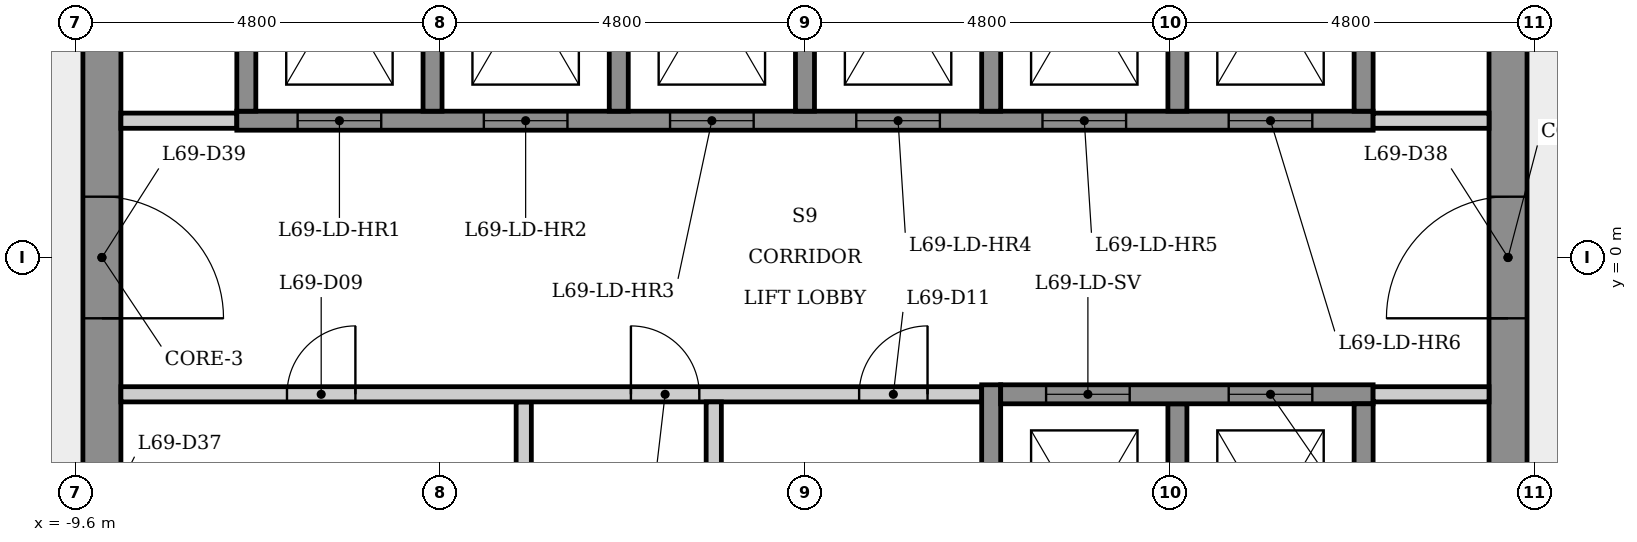
"""IFC4 building model, lengths in metres.
Left out: names, types, materials, properties, quantities, classifications, styles, units other than length and angle.
Written with IfcOpenShell. Run it as: python <this file> out.ifc"""

import sys

from ifc_helpers import new_model, si_unit, direction, frame, frame_2d, origin, place, context, subcontext, project, spatial, rectangle, extrude, element, fill, save


model = new_model("IFC4")
c1 = context("Model", 3, precision=1e-05, world=origin(), true_north=direction((0.0, 1.0)))
c2 = subcontext(c1, "Body", "Model", "MODEL_VIEW")
j1 = project(units=[si_unit("LENGTHUNIT", "METRE"), si_unit("PLANEANGLEUNIT", "RADIAN")], contexts=[c1])
p1 = place(None, origin())
s1 = spatial("IfcSite", under=j1, at=p1, CompositionType="ELEMENT")
p2 = place(p1, origin())
s2 = spatial("IfcBuilding", under=s1, at=p2, CompositionType="ELEMENT")
p3 = place(p2, frame((0.0, 0.0, 257.9)))
s3 = spatial("IfcBuildingStorey", under=s2, at=p3, CompositionType="ELEMENT", Elevation=257.9)
p4 = place(p3, frame((9.25, -5.485, 0.0), z_axis=(0.0, 0.0, 1.0), x_axis=(0.0, 1.0, 0.0)))
e1 = element("IfcWall", 1, at=p4, inside=s3, PredefinedType="SHEAR", context=c2, shape_type="SweptSolid", body=[
    extrude(rectangle(XDim=10.97, YDim=0.5, at=frame_2d((5.485, 0.0))), origin(), (0.0, 0.0, 1.0), 5.0),
])
p5 = place(p4, frame((4.685, 0.0, 0.0)))
e2 = element("IfcOpeningElement", 2, at=p5, cuts=e1, PredefinedType="OPENING", context=c2, shape_type="SweptSolid", body=[
    extrude(rectangle(XDim=1.6, YDim=2.1, at=frame_2d((0.8, 1.05))), frame((0.0, 0.26, 0.0), z_axis=(0.0, -1.0, 0.0), x_axis=(1.0, 0.0, 0.0)), (0.0, 0.0, 1.0), 0.52),
])
p6 = place(p3, frame((-9.25, 5.485, 0.0), z_axis=(0.0, 0.0, 1.0), x_axis=(0.0, -1.0, 0.0)))
e3 = element("IfcWall", 3, at=p6, inside=s3, PredefinedType="SHEAR", context=c2, shape_type="SweptSolid", body=[
    extrude(rectangle(XDim=10.97, YDim=0.5, at=frame_2d((5.485, 0.0))), origin(), (0.0, 0.0, 1.0), 5.0),
])
p7 = place(p6, frame((8.51, 0.0, 0.0)))
e4 = element("IfcOpeningElement", 4, at=p7, cuts=e3, PredefinedType="OPENING", context=c2, shape_type="SweptSolid", body=[
    extrude(rectangle(XDim=0.9, YDim=2.1, at=frame_2d((0.45, 1.05))), frame((0.0, 0.26, 0.0), z_axis=(0.0, -1.0, 0.0), x_axis=(1.0, 0.0, 0.0)), (0.0, 0.0, 1.0), 0.52),
])
p8 = place(p6, frame((4.685, 0.0, 0.0)))
e5 = element("IfcOpeningElement", 5, at=p8, cuts=e3, PredefinedType="OPENING", context=c2, shape_type="SweptSolid", body=[
    extrude(rectangle(XDim=1.6, YDim=2.1, at=frame_2d((0.8, 1.05))), frame((0.0, 0.26, 0.0), z_axis=(0.0, -1.0, 0.0), x_axis=(1.0, 0.0, 0.0)), (0.0, 0.0, 1.0), 0.52),
])
p9 = place(p3, frame((-9.0, 1.8, 0.0), z_axis=(0.0, 0.0, 1.0), x_axis=(1.0, 0.0, 0.0)))
e6 = element("IfcWall", 6, at=p9, inside=s3, PredefinedType="PARTITIONING", context=c2, shape_type="SweptSolid", body=[
    extrude(rectangle(XDim=1.525, YDim=0.2, at=frame_2d((0.763, 0.0))), origin(), (0.0, 0.0, 1.0), 4.6),
])
p10 = place(p3, frame((-7.475, 1.8, 0.0), z_axis=(0.0, 0.0, 1.0), x_axis=(1.0, 0.0, 0.0)))
e7 = element("IfcWall", 7, at=p10, inside=s3, PredefinedType="SHEAR", context=c2, shape_type="SweptSolid", body=[
    extrude(rectangle(XDim=14.95, YDim=0.25, at=frame_2d((7.475, 0.0))), origin(), (0.0, 0.0, 1.0), 4.6),
])
p11 = place(p10, frame((0.8, 0.0, 0.0)))
e8 = element("IfcOpeningElement", 8, at=p11, cuts=e7, PredefinedType="OPENING", context=c2, shape_type="SweptSolid", body=[
    extrude(rectangle(XDim=1.1, YDim=2.1, at=frame_2d((0.55, 1.05))), frame((0.0, 0.135, 0.0), z_axis=(0.0, -1.0, 0.0), x_axis=(1.0, 0.0, 0.0)), (0.0, 0.0, 1.0), 0.27),
])
p12 = place(p10, frame((3.25, 0.0, 0.0)))
e9 = element("IfcOpeningElement", 9, at=p12, cuts=e7, PredefinedType="OPENING", context=c2, shape_type="SweptSolid", body=[
    extrude(rectangle(XDim=1.1, YDim=2.1, at=frame_2d((0.55, 1.05))), frame((0.0, 0.135, 0.0), z_axis=(0.0, -1.0, 0.0), x_axis=(1.0, 0.0, 0.0)), (0.0, 0.0, 1.0), 0.27),
])
p13 = place(p10, frame((5.7, 0.0, 0.0)))
e10 = element("IfcOpeningElement", 10, at=p13, cuts=e7, PredefinedType="OPENING", context=c2, shape_type="SweptSolid", body=[
    extrude(rectangle(XDim=1.1, YDim=2.1, at=frame_2d((0.55, 1.05))), frame((0.0, 0.135, 0.0), z_axis=(0.0, -1.0, 0.0), x_axis=(1.0, 0.0, 0.0)), (0.0, 0.0, 1.0), 0.27),
])
p14 = place(p10, frame((8.15, 0.0, 0.0)))
e11 = element("IfcOpeningElement", 11, at=p14, cuts=e7, PredefinedType="OPENING", context=c2, shape_type="SweptSolid", body=[
    extrude(rectangle(XDim=1.1, YDim=2.1, at=frame_2d((0.55, 1.05))), frame((0.0, 0.135, 0.0), z_axis=(0.0, -1.0, 0.0), x_axis=(1.0, 0.0, 0.0)), (0.0, 0.0, 1.0), 0.27),
])
p15 = place(p10, frame((10.6, 0.0, 0.0)))
e12 = element("IfcOpeningElement", 12, at=p15, cuts=e7, PredefinedType="OPENING", context=c2, shape_type="SweptSolid", body=[
    extrude(rectangle(XDim=1.1, YDim=2.1, at=frame_2d((0.55, 1.05))), frame((0.0, 0.135, 0.0), z_axis=(0.0, -1.0, 0.0), x_axis=(1.0, 0.0, 0.0)), (0.0, 0.0, 1.0), 0.27),
])
p16 = place(p10, frame((13.05, 0.0, 0.0)))
e13 = element("IfcOpeningElement", 13, at=p16, cuts=e7, PredefinedType="OPENING", context=c2, shape_type="SweptSolid", body=[
    extrude(rectangle(XDim=1.1, YDim=2.1, at=frame_2d((0.55, 1.05))), frame((0.0, 0.135, 0.0), z_axis=(0.0, -1.0, 0.0), x_axis=(1.0, 0.0, 0.0)), (0.0, 0.0, 1.0), 0.27),
])
p17 = place(p3, frame((-7.35, 1.925, 0.0), z_axis=(0.0, 0.0, 1.0), x_axis=(0.0, 1.0, 0.0)))
e14 = element("IfcWall", 14, at=p17, inside=s3, PredefinedType="SHEAR", context=c2, shape_type="SweptSolid", body=[
    extrude(rectangle(XDim=3.35, YDim=0.25, at=frame_2d((1.675, 0.0))), origin(), (0.0, 0.0, 1.0), 4.6),
])
p18 = place(p3, frame((-4.9, 5.025, 0.0), z_axis=(0.0, 0.0, 1.0), x_axis=(0.0, -1.0, 0.0)))
e15 = element("IfcWall", 15, at=p18, inside=s3, PredefinedType="SHEAR", context=c2, shape_type="SweptSolid", body=[
    extrude(rectangle(XDim=3.1, YDim=0.25, at=frame_2d((1.55, 0.0))), origin(), (0.0, 0.0, 1.0), 4.6),
])
p19 = place(p3, frame((-3.7, -1.9, 0.0), z_axis=(0.0, 0.0, 1.0), x_axis=(0.0, -1.0, 0.0)))
e16 = element("IfcWall", 16, at=p19, inside=s3, PredefinedType="PARTITIONING", context=c2, shape_type="SweptSolid", body=[
    extrude(rectangle(XDim=3.15, YDim=0.2, at=frame_2d((1.575, 0.0))), origin(), (0.0, 0.0, 1.0), 4.6),
])
p20 = place(p3, frame((-9.0, -1.8, 0.0), z_axis=(0.0, 0.0, 1.0), x_axis=(1.0, 0.0, 0.0)))
e17 = element("IfcWall", 17, at=p20, inside=s3, PredefinedType="PARTITIONING", context=c2, shape_type="SweptSolid", body=[
    extrude(rectangle(XDim=11.325, YDim=0.2, at=frame_2d((5.663, 0.0))), origin(), (0.0, 0.0, 1.0), 4.6),
])
p21 = place(p20, frame((2.185, 0.0, 0.0)))
e18 = element("IfcOpeningElement", 18, at=p21, cuts=e17, PredefinedType="OPENING", context=c2, shape_type="SweptSolid", body=[
    extrude(rectangle(XDim=0.9, YDim=2.1, at=frame_2d((0.45, 1.05))), frame((0.0, 0.11, 0.0), z_axis=(0.0, -1.0, 0.0), x_axis=(1.0, 0.0, 0.0)), (0.0, 0.0, 1.0), 0.22),
])
p22 = place(p20, frame((6.71, 0.0, 0.0)))
e19 = element("IfcOpeningElement", 19, at=p22, cuts=e17, PredefinedType="OPENING", context=c2, shape_type="SweptSolid", body=[
    extrude(rectangle(XDim=0.9, YDim=2.1, at=frame_2d((0.45, 1.05))), frame((0.0, 0.11, 0.0), z_axis=(0.0, -1.0, 0.0), x_axis=(1.0, 0.0, 0.0)), (0.0, 0.0, 1.0), 0.22),
])
p23 = place(p20, frame((9.713, 0.0, 0.0)))
e20 = element("IfcOpeningElement", 20, at=p23, cuts=e17, PredefinedType="OPENING", context=c2, shape_type="SweptSolid", body=[
    extrude(rectangle(XDim=0.9, YDim=2.1, at=frame_2d((0.45, 1.05))), frame((0.0, 0.11, 0.0), z_axis=(0.0, -1.0, 0.0), x_axis=(1.0, 0.0, 0.0)), (0.0, 0.0, 1.0), 0.22),
])
p24 = place(p3, frame((-2.45, 5.025, 0.0), z_axis=(0.0, 0.0, 1.0), x_axis=(0.0, -1.0, 0.0)))
e21 = element("IfcWall", 21, at=p24, inside=s3, PredefinedType="SHEAR", context=c2, shape_type="SweptSolid", body=[
    extrude(rectangle(XDim=3.1, YDim=0.25, at=frame_2d((1.55, 0.0))), origin(), (0.0, 0.0, 1.0), 4.6),
])
p25 = place(p3, frame((-1.2, -1.9, 0.0), z_axis=(0.0, 0.0, 1.0), x_axis=(0.0, -1.0, 0.0)))
e22 = element("IfcWall", 22, at=p25, inside=s3, PredefinedType="PARTITIONING", context=c2, shape_type="SweptSolid", body=[
    extrude(rectangle(XDim=3.15, YDim=0.2, at=frame_2d((1.575, 0.0))), origin(), (0.0, 0.0, 1.0), 4.6),
])
p26 = place(p3, frame((0.0, 5.025, 0.0), z_axis=(0.0, 0.0, 1.0), x_axis=(0.0, -1.0, 0.0)))
e23 = element("IfcWall", 23, at=p26, inside=s3, PredefinedType="SHEAR", context=c2, shape_type="SweptSolid", body=[
    extrude(rectangle(XDim=3.1, YDim=0.25, at=frame_2d((1.55, 0.0))), origin(), (0.0, 0.0, 1.0), 4.6),
])
p27 = place(p3, frame((2.45, -5.275, 0.0), z_axis=(0.0, 0.0, 1.0), x_axis=(0.0, 1.0, 0.0)))
e24 = element("IfcWall", 24, at=p27, inside=s3, PredefinedType="SHEAR", context=c2, shape_type="SweptSolid", body=[
    extrude(rectangle(XDim=3.6, YDim=0.25, at=frame_2d((1.8, 0.0))), origin(), (0.0, 0.0, 1.0), 4.6),
])
p28 = place(p3, frame((2.45, 5.025, 0.0), z_axis=(0.0, 0.0, 1.0), x_axis=(0.0, -1.0, 0.0)))
e25 = element("IfcWall", 25, at=p28, inside=s3, PredefinedType="SHEAR", context=c2, shape_type="SweptSolid", body=[
    extrude(rectangle(XDim=3.1, YDim=0.25, at=frame_2d((1.55, 0.0))), origin(), (0.0, 0.0, 1.0), 4.6),
])
p29 = place(p3, frame((4.9, -1.925, 0.0), z_axis=(0.0, 0.0, 1.0), x_axis=(0.0, -1.0, 0.0)))
e26 = element("IfcWall", 26, at=p29, inside=s3, PredefinedType="SHEAR", context=c2, shape_type="SweptSolid", body=[
    extrude(rectangle(XDim=3.1, YDim=0.25, at=frame_2d((1.55, 0.0))), origin(), (0.0, 0.0, 1.0), 5.0),
])
p30 = place(p3, frame((4.9, 5.025, 0.0), z_axis=(0.0, 0.0, 1.0), x_axis=(0.0, -1.0, 0.0)))
e27 = element("IfcWall", 27, at=p30, inside=s3, PredefinedType="SHEAR", context=c2, shape_type="SweptSolid", body=[
    extrude(rectangle(XDim=3.1, YDim=0.25, at=frame_2d((1.55, 0.0))), origin(), (0.0, 0.0, 1.0), 4.6),
])
p31 = place(p3, frame((2.575, -1.8, 0.0), z_axis=(0.0, 0.0, 1.0), x_axis=(1.0, 0.0, 0.0)))
e28 = element("IfcWall", 28, at=p31, inside=s3, PredefinedType="SHEAR", context=c2, shape_type="SweptSolid", body=[
    extrude(rectangle(XDim=4.9, YDim=0.25, at=frame_2d((2.45, 0.0))), origin(), (0.0, 0.0, 1.0), 4.6),
])
p32 = place(p31, frame((0.597, 0.0, 0.0)))
e29 = element("IfcOpeningElement", 29, at=p32, cuts=e28, PredefinedType="OPENING", context=c2, shape_type="SweptSolid", body=[
    extrude(rectangle(XDim=1.1, YDim=2.1, at=frame_2d((0.55, 1.05))), frame((0.0, 0.135, 0.0), z_axis=(0.0, -1.0, 0.0), x_axis=(1.0, 0.0, 0.0)), (0.0, 0.0, 1.0), 0.27),
])
p33 = place(p31, frame((3.0, 0.0, 0.0)))
e30 = element("IfcOpeningElement", 30, at=p33, cuts=e28, PredefinedType="OPENING", context=c2, shape_type="SweptSolid", body=[
    extrude(rectangle(XDim=1.1, YDim=2.1, at=frame_2d((0.55, 1.05))), frame((0.0, 0.135, 0.0), z_axis=(0.0, -1.0, 0.0), x_axis=(1.0, 0.0, 0.0)), (0.0, 0.0, 1.0), 0.27),
])
p34 = place(p3, frame((7.475, 1.8, 0.0), z_axis=(0.0, 0.0, 1.0), x_axis=(1.0, 0.0, 0.0)))
e31 = element("IfcWall", 31, at=p34, inside=s3, PredefinedType="PARTITIONING", context=c2, shape_type="SweptSolid", body=[
    extrude(rectangle(XDim=1.525, YDim=0.2, at=frame_2d((0.763, 0.0))), origin(), (0.0, 0.0, 1.0), 4.6),
])
for number, where, z_axis, x_axis in (
    (32, (7.35, -1.925, 0.0), (0.0, 0.0, 1.0), (0.0, -1.0, 0.0)),
    (33, (7.35, 5.025, 0.0), (0.0, 0.0, 1.0), (0.0, -1.0, 0.0)),
):
    element("IfcWall", number, at=place(p3, frame(where, z_axis=z_axis, x_axis=x_axis)), inside=s3, PredefinedType="SHEAR", context=c2, shape_type="SweptSolid", body=[
        extrude(rectangle(XDim=3.1, YDim=0.25, at=frame_2d((1.55, 0.0))), origin(), (0.0, 0.0, 1.0), 4.6),
    ])
p35 = place(p3, frame((9.0, -1.8, 0.0), z_axis=(0.0, 0.0, 1.0), x_axis=(-1.0, 0.0, 0.0)))
e34 = element("IfcWall", 34, at=p35, inside=s3, PredefinedType="PARTITIONING", context=c2, shape_type="SweptSolid", body=[
    extrude(rectangle(XDim=1.525, YDim=0.2, at=frame_2d((0.763, 0.0))), origin(), (0.0, 0.0, 1.0), 4.6),
])
p36 = place(p11, origin())
e35 = element("IfcDoor", 35, at=p36, inside=s3, OperationType="SLIDING_TO_LEFT", PredefinedType="DOOR", context=c2, shape_type="SweptSolid", body=[
    extrude(rectangle(XDim=1.1, YDim=2.1, at=frame_2d((0.55, 1.05))), frame((0.0, 0.025, 0.0), z_axis=(0.0, -1.0, 0.0), x_axis=(1.0, 0.0, 0.0)), (0.0, 0.0, 1.0), 0.05),
])
fill(e8, e35)
p37 = place(p12, origin())
e36 = element("IfcDoor", 36, at=p37, inside=s3, OperationType="SLIDING_TO_LEFT", PredefinedType="DOOR", context=c2, shape_type="SweptSolid", body=[
    extrude(rectangle(XDim=1.1, YDim=2.1, at=frame_2d((0.55, 1.05))), frame((0.0, 0.025, 0.0), z_axis=(0.0, -1.0, 0.0), x_axis=(1.0, 0.0, 0.0)), (0.0, 0.0, 1.0), 0.05),
])
fill(e9, e36)
p38 = place(p13, origin())
e37 = element("IfcDoor", 37, at=p38, inside=s3, OperationType="SLIDING_TO_LEFT", PredefinedType="DOOR", context=c2, shape_type="SweptSolid", body=[
    extrude(rectangle(XDim=1.1, YDim=2.1, at=frame_2d((0.55, 1.05))), frame((0.0, 0.025, 0.0), z_axis=(0.0, -1.0, 0.0), x_axis=(1.0, 0.0, 0.0)), (0.0, 0.0, 1.0), 0.05),
])
fill(e10, e37)
p39 = place(p14, origin())
e38 = element("IfcDoor", 38, at=p39, inside=s3, OperationType="SLIDING_TO_LEFT", PredefinedType="DOOR", context=c2, shape_type="SweptSolid", body=[
    extrude(rectangle(XDim=1.1, YDim=2.1, at=frame_2d((0.55, 1.05))), frame((0.0, 0.025, 0.0), z_axis=(0.0, -1.0, 0.0), x_axis=(1.0, 0.0, 0.0)), (0.0, 0.0, 1.0), 0.05),
])
fill(e11, e38)
p40 = place(p15, origin())
e39 = element("IfcDoor", 39, at=p40, inside=s3, OperationType="SLIDING_TO_LEFT", PredefinedType="DOOR", context=c2, shape_type="SweptSolid", body=[
    extrude(rectangle(XDim=1.1, YDim=2.1, at=frame_2d((0.55, 1.05))), frame((0.0, 0.025, 0.0), z_axis=(0.0, -1.0, 0.0), x_axis=(1.0, 0.0, 0.0)), (0.0, 0.0, 1.0), 0.05),
])
fill(e12, e39)
p41 = place(p16, origin())
e40 = element("IfcDoor", 40, at=p41, inside=s3, OperationType="SLIDING_TO_LEFT", PredefinedType="DOOR", context=c2, shape_type="SweptSolid", body=[
    extrude(rectangle(XDim=1.1, YDim=2.1, at=frame_2d((0.55, 1.05))), frame((0.0, 0.025, 0.0), z_axis=(0.0, -1.0, 0.0), x_axis=(1.0, 0.0, 0.0)), (0.0, 0.0, 1.0), 0.05),
])
fill(e13, e40)
p42 = place(p32, origin())
e41 = element("IfcDoor", 41, at=p42, inside=s3, OperationType="SLIDING_TO_LEFT", PredefinedType="DOOR", context=c2, shape_type="SweptSolid", body=[
    extrude(rectangle(XDim=1.1, YDim=2.1, at=frame_2d((0.55, 1.05))), frame((0.0, 0.025, 0.0), z_axis=(0.0, -1.0, 0.0), x_axis=(1.0, 0.0, 0.0)), (0.0, 0.0, 1.0), 0.05),
])
fill(e29, e41)
p43 = place(p33, origin())
e42 = element("IfcDoor", 42, at=p43, inside=s3, OperationType="SLIDING_TO_LEFT", PredefinedType="DOOR", context=c2, shape_type="SweptSolid", body=[
    extrude(rectangle(XDim=1.1, YDim=2.1, at=frame_2d((0.55, 1.05))), frame((0.0, 0.025, 0.0), z_axis=(0.0, -1.0, 0.0), x_axis=(1.0, 0.0, 0.0)), (0.0, 0.0, 1.0), 0.05),
])
fill(e30, e42)
p44 = place(p21, origin())
e43 = element("IfcDoor", 43, at=p44, inside=s3, OperationType="SINGLE_SWING_RIGHT", PredefinedType="DOOR", context=c2, shape_type="SweptSolid", body=[
    extrude(rectangle(XDim=0.9, YDim=2.1, at=frame_2d((0.45, 1.05))), frame((0.0, 0.025, 0.0), z_axis=(0.0, -1.0, 0.0), x_axis=(1.0, 0.0, 0.0)), (0.0, 0.0, 1.0), 0.05),
])
fill(e18, e43)
p45 = place(p22, origin())
e44 = element("IfcDoor", 44, at=p45, inside=s3, OperationType="SINGLE_SWING_LEFT", PredefinedType="DOOR", context=c2, shape_type="SweptSolid", body=[
    extrude(rectangle(XDim=0.9, YDim=2.1, at=frame_2d((0.45, 1.05))), frame((0.0, 0.025, 0.0), z_axis=(0.0, -1.0, 0.0), x_axis=(1.0, 0.0, 0.0)), (0.0, 0.0, 1.0), 0.05),
])
fill(e19, e44)
p46 = place(p23, origin())
e45 = element("IfcDoor", 45, at=p46, inside=s3, OperationType="SINGLE_SWING_RIGHT", PredefinedType="DOOR", context=c2, shape_type="SweptSolid", body=[
    extrude(rectangle(XDim=0.9, YDim=2.1, at=frame_2d((0.45, 1.05))), frame((0.0, 0.025, 0.0), z_axis=(0.0, -1.0, 0.0), x_axis=(1.0, 0.0, 0.0)), (0.0, 0.0, 1.0), 0.05),
])
fill(e20, e45)
p47 = place(p5, origin())
e46 = element("IfcDoor", 46, at=p47, inside=s3, OperationType="SINGLE_SWING_LEFT", PredefinedType="DOOR", context=c2, shape_type="SweptSolid", body=[
    extrude(rectangle(XDim=1.6, YDim=2.1, at=frame_2d((0.8, 1.05))), frame((0.0, 0.025, 0.0), z_axis=(0.0, -1.0, 0.0), x_axis=(1.0, 0.0, 0.0)), (0.0, 0.0, 1.0), 0.05),
])
fill(e2, e46)
p48 = place(p8, origin())
e47 = element("IfcDoor", 47, at=p48, inside=s3, OperationType="SINGLE_SWING_RIGHT", PredefinedType="DOOR", context=c2, shape_type="SweptSolid", body=[
    extrude(rectangle(XDim=1.6, YDim=2.1, at=frame_2d((0.8, 1.05))), frame((0.0, 0.025, 0.0), z_axis=(0.0, -1.0, 0.0), x_axis=(1.0, 0.0, 0.0)), (0.0, 0.0, 1.0), 0.05),
])
fill(e5, e47)
save(model, sys.argv[1])
